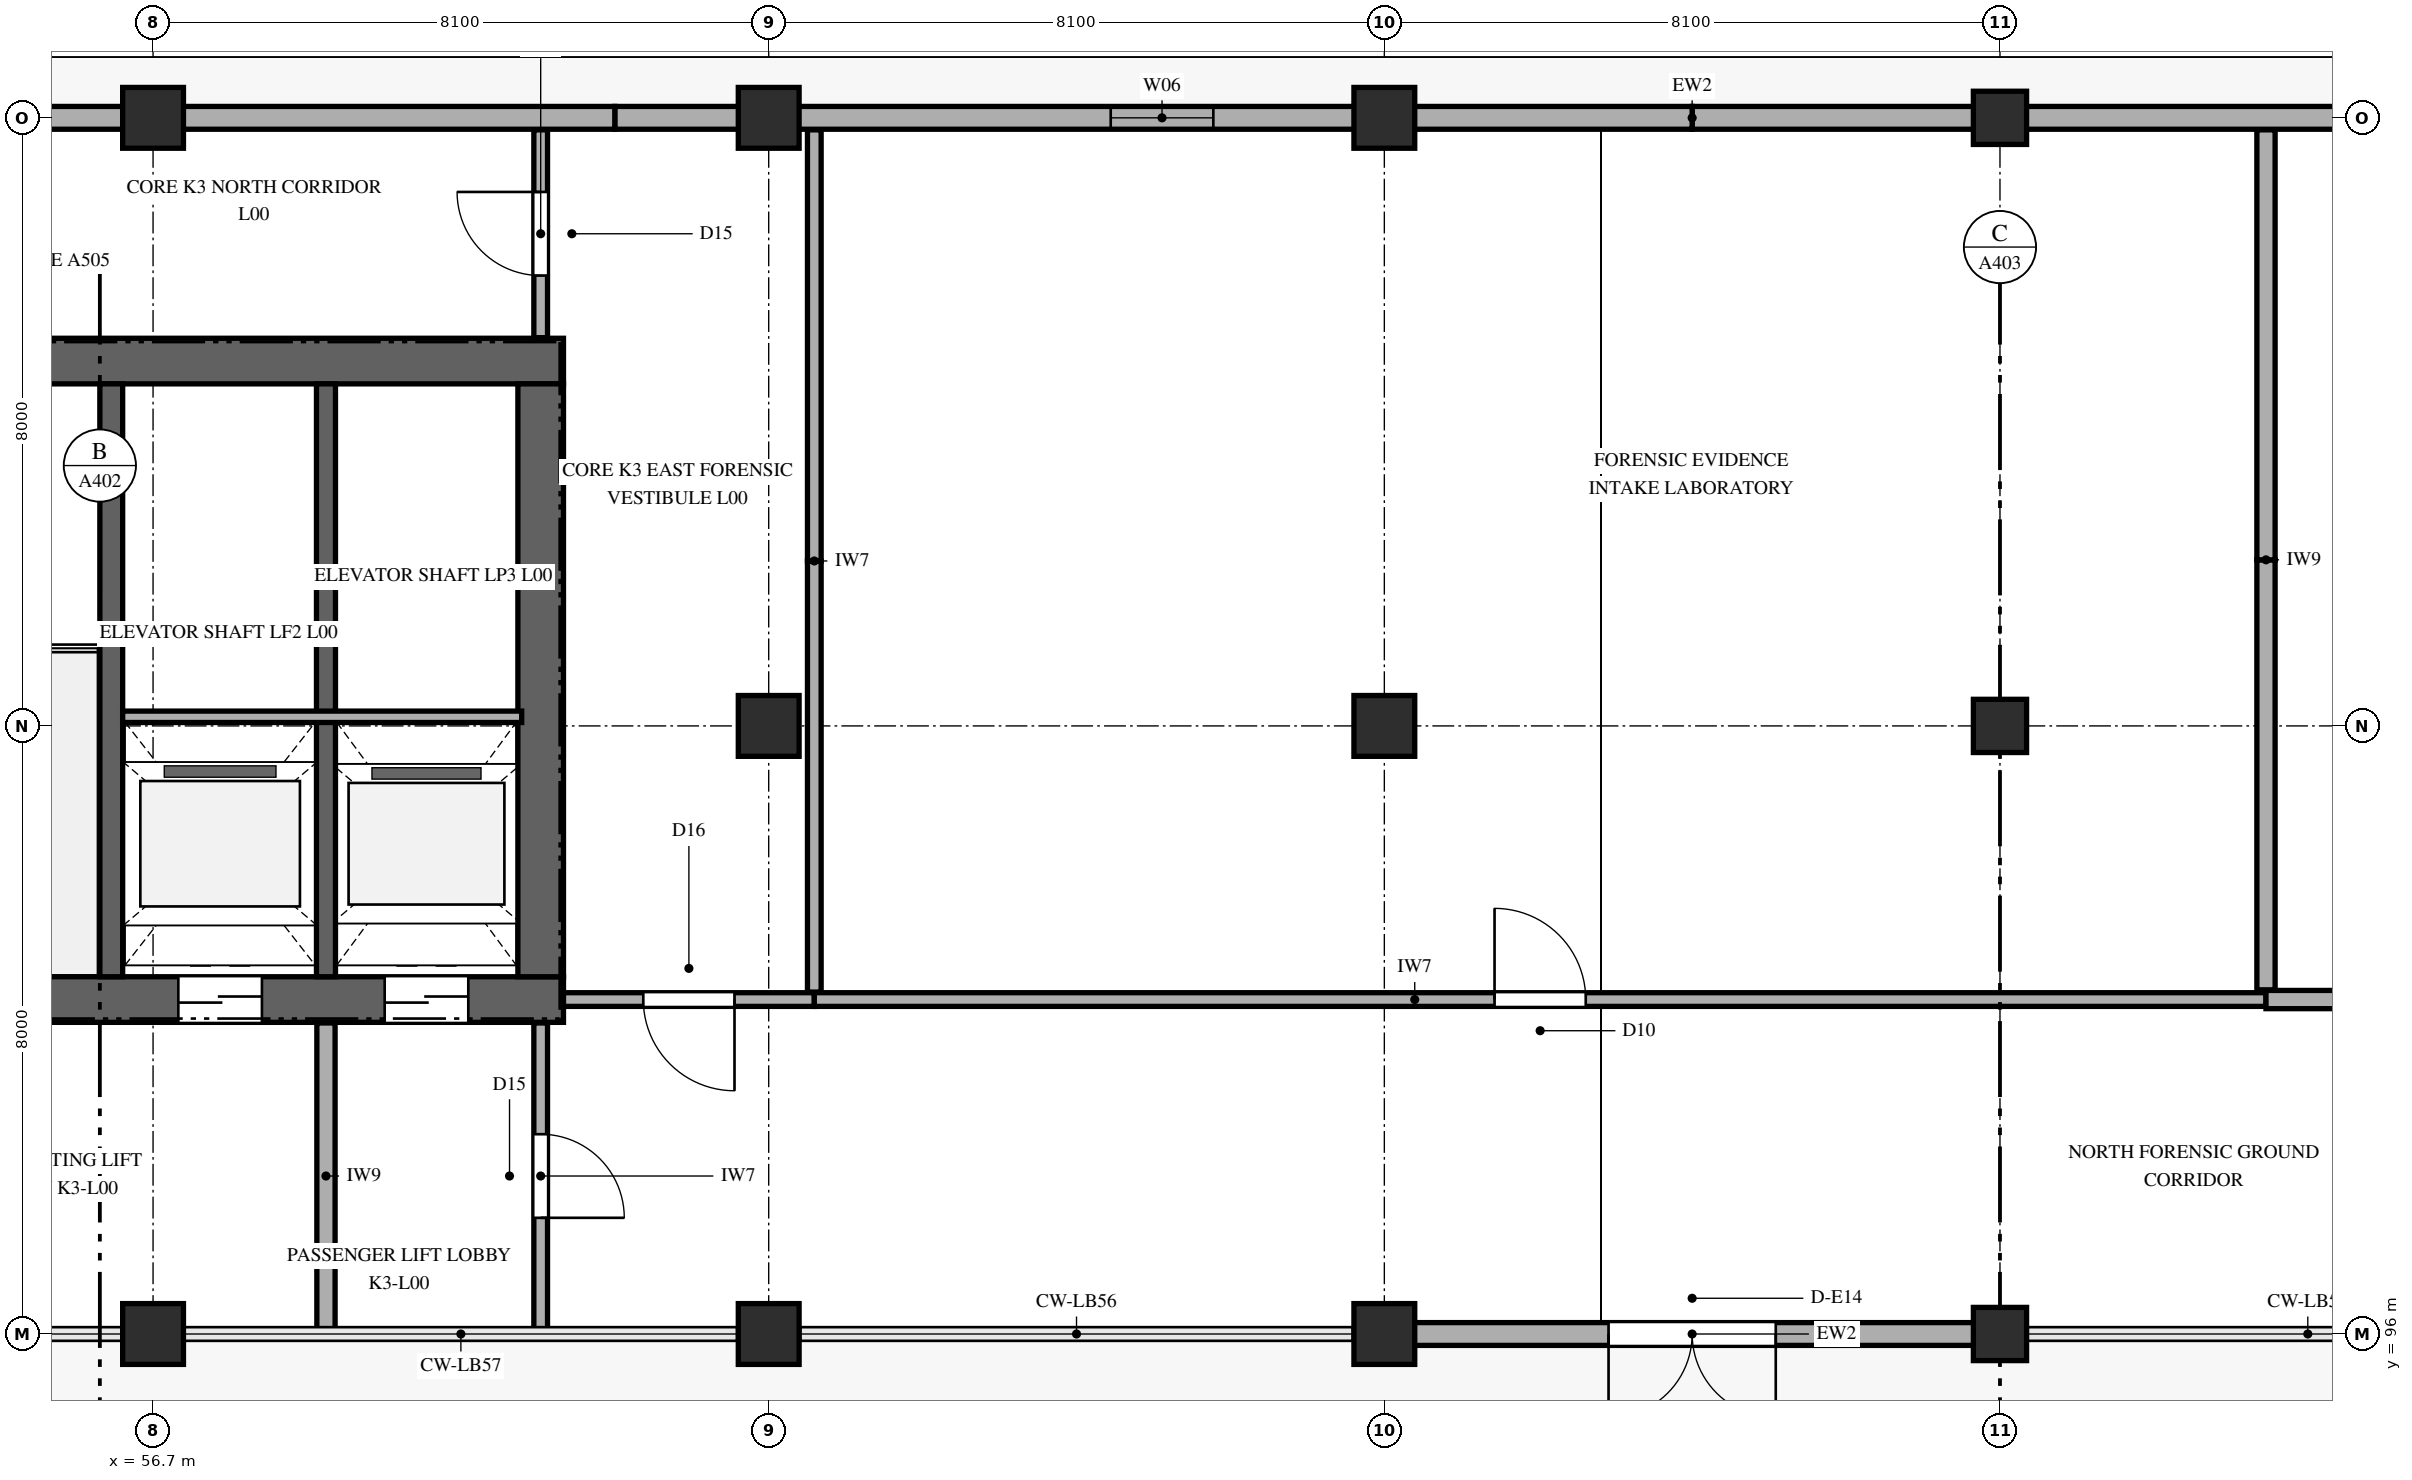
"""IFC4 building model, lengths in metres.
Left out: names, types, materials, properties, quantities, classifications, styles, units other than length and angle.
Written with IfcOpenShell. Run it as: python <this file> out.ifc"""

import sys

from ifc_helpers import new_model, si_unit, direction, frame, frame_2d, origin, origin_2d, place, context, subcontext, project, spatial, rectangle, extrude, element, fill, save


model = new_model("IFC4")
c1 = context("Model", 3, precision=1e-05, world=origin(), true_north=direction((0.0, 1.0)))
c2 = subcontext(c1, "Body", "Model", "MODEL_VIEW")
j1 = project(units=[si_unit("LENGTHUNIT", "METRE"), si_unit("PLANEANGLEUNIT", "RADIAN")], contexts=[c1])
p1 = place(None, origin())
s1 = spatial("IfcSite", under=j1, at=p1, CompositionType="ELEMENT")
p2 = place(p1, origin())
s2 = spatial("IfcBuilding", under=s1, at=p2, CompositionType="ELEMENT")
p3 = place(p2, origin())
s3 = spatial("IfcBuildingStorey", under=s2, at=p3, CompositionType="ELEMENT", Elevation=0.0)
p4 = place(p3, frame((46.7, 100.4, 0.0), z_axis=(0.0, 0.0, 1.0), x_axis=(1.0, 0.0, 0.0)))
e1 = element("IfcWall", 1, at=p4, inside=s3, PredefinedType="SHEAR", context=c2, shape_type="SweptSolid", body=[
    extrude(rectangle(XDim=15.4, YDim=0.6, at=frame_2d((7.7, 0.0))), origin(), (0.0, 0.0, 1.0), 5.4),
])
p5 = place(p4, frame((1.05, 0.0, 0.0)))
e2 = element("IfcOpeningElement", 2, at=p5, cuts=e1, PredefinedType="OPENING", context=c2, shape_type="SweptSolid", body=[
    extrude(rectangle(XDim=1.15, YDim=2.25, at=frame_2d((0.575, 1.125))), frame((0.0, 0.31, 0.0), z_axis=(0.0, -1.0, 0.0), x_axis=(1.0, 0.0, 0.0)), (0.0, 0.0, 1.0), 0.62),
])
p6 = place(p4, frame((10.333, 0.0, 0.0)))
e3 = element("IfcOpeningElement", 3, at=p6, cuts=e1, PredefinedType="OPENING", context=c2, shape_type="SweptSolid", body=[
    extrude(rectangle(XDim=1.1, YDim=2.2, at=frame_2d((0.55, 1.1))), frame((0.0, 0.31, 0.0), z_axis=(0.0, -1.0, 0.0), x_axis=(1.0, 0.0, 0.0)), (0.0, 0.0, 1.0), 0.62),
])
p7 = place(p4, frame((13.048, 0.0, 0.0)))
e4 = element("IfcOpeningElement", 4, at=p7, cuts=e1, PredefinedType="OPENING", context=c2, shape_type="SweptSolid", body=[
    extrude(rectangle(XDim=1.1, YDim=2.2, at=frame_2d((0.55, 1.1))), frame((0.0, 0.31, 0.0), z_axis=(0.0, -1.0, 0.0), x_axis=(1.0, 0.0, 0.0)), (0.0, 0.0, 1.0), 0.62),
])
p8 = place(p3, frame((46.7, 108.8, 0.0), z_axis=(0.0, 0.0, 1.0), x_axis=(1.0, 0.0, 0.0)))
e5 = element("IfcWall", 5, at=p8, inside=s3, PredefinedType="SHEAR", context=c2, shape_type="SweptSolid", body=[
    extrude(rectangle(XDim=15.4, YDim=0.6, at=frame_2d((7.7, 0.0))), origin(), (0.0, 0.0, 1.0), 5.4),
])
p9 = place(p3, frame((61.8, 100.7, 0.0), z_axis=(0.0, 0.0, 1.0), x_axis=(0.0, 1.0, 0.0)))
e6 = element("IfcWall", 6, at=p9, inside=s3, PredefinedType="SHEAR", context=c2, shape_type="SweptSolid", body=[
    extrude(rectangle(XDim=7.8, YDim=0.6, at=frame_2d((3.9, 0.0))), origin(), (0.0, 0.0, 1.0), 5.4),
])
p10 = place(p3, frame((56.15, 100.7, 0.0), z_axis=(0.0, 0.0, 1.0), x_axis=(0.0, 1.0, 0.0)))
e7 = element("IfcWall", 7, at=p10, inside=s3, PredefinedType="SHEAR", context=c2, shape_type="SweptSolid", body=[
    extrude(rectangle(XDim=7.8, YDim=0.3, at=frame_2d((3.9, 0.0))), origin(), (0.0, 0.0, 1.0), 5.4),
])
p11 = place(p3, frame((58.975, 100.7, 0.0), z_axis=(0.0, 0.0, 1.0), x_axis=(0.0, 1.0, 0.0)))
e8 = element("IfcWall", 8, at=p11, inside=s3, PredefinedType="SHEAR", context=c2, shape_type="SweptSolid", body=[
    extrude(rectangle(XDim=7.8, YDim=0.25, at=frame_2d((3.9, 0.0))), origin(), (0.0, 0.0, 1.0), 5.4),
])
for number, where, z_axis, x_axis in (
    (9, (56.7, 96.0, 0.0), (0.0, 0.0, 1.0), (1.0, 0.0, 0.0)),
    (10, (56.7, 112.0, 0.0), (0.0, 0.0, 1.0), (1.0, 0.0, 0.0)),
    (11, (64.8, 96.0, 0.0), (0.0, 0.0, 1.0), (1.0, 0.0, 0.0)),
    (12, (64.8, 104.0, 0.0), (0.0, 0.0, 1.0), (1.0, 0.0, 0.0)),
    (13, (64.8, 112.0, 0.0), (0.0, 0.0, 1.0), (1.0, 0.0, 0.0)),
    (14, (72.9, 96.0, 0.0), (0.0, 0.0, 1.0), (1.0, 0.0, 0.0)),
    (15, (72.9, 104.0, 0.0), (0.0, 0.0, 1.0), (1.0, 0.0, 0.0)),
    (16, (72.9, 112.0, 0.0), (0.0, 0.0, 1.0), (1.0, 0.0, 0.0)),
):
    element("IfcColumn", number, at=place(p3, frame(where, z_axis=z_axis, x_axis=x_axis)), inside=s3, PredefinedType="COLUMN", context=c2, shape_type="SweptSolid", body=[
        extrude(rectangle(XDim=0.8, YDim=0.8, at=origin_2d()), origin(), (0.0, 0.0, 1.0), 5.4),
    ])
for number, where, z_axis, x_axis in (
    (17, (81.0, 96.0, 0.0), (0.0, 0.0, 1.0), (1.0, 0.0, 0.0)),
    (18, (81.0, 104.0, 0.0), (0.0, 0.0, 1.0), (1.0, 0.0, 0.0)),
    (19, (81.0, 112.0, 0.0), (0.0, 0.0, 1.0), (1.0, 0.0, 0.0)),
):
    element("IfcColumn", number, at=place(p3, frame(where, z_axis=z_axis, x_axis=x_axis)), inside=s3, PredefinedType="COLUMN", context=c2, shape_type="SweptSolid", body=[
        extrude(rectangle(XDim=0.7, YDim=0.7, at=origin_2d()), origin(), (0.0, 0.0, 1.0), 5.4),
    ])
p12 = place(p3, frame((73.08, 96.0, 0.0), z_axis=(0.0, 0.0, 1.0), x_axis=(1.0, 0.0, 0.0)))
e20 = element("IfcWall", 20, at=p12, inside=s3, PredefinedType="SOLIDWALL", context=c2, shape_type="SweptSolid", body=[
    extrude(rectangle(XDim=7.74, YDim=0.3, at=frame_2d((3.87, 0.0))), origin(), (0.0, 0.0, 1.0), 4.412),
])
p13 = place(p12, frame((2.77, 0.0, 0.0)))
e21 = element("IfcOpeningElement", 21, at=p13, cuts=e20, PredefinedType="OPENING", context=c2, shape_type="SweptSolid", body=[
    extrude(rectangle(XDim=2.2, YDim=2.6, at=frame_2d((1.1, 1.3))), frame((0.0, 0.16, 0.0), z_axis=(0.0, -1.0, 0.0), x_axis=(1.0, 0.0, 0.0)), (0.0, 0.0, 1.0), 0.32),
])
p14 = place(p3, frame((91.125, 112.0, 0.0), z_axis=(0.0, 0.0, 1.0), x_axis=(-1.0, 0.0, 0.0)))
e22 = element("IfcWall", 22, at=p14, inside=s3, PredefinedType="SOLIDWALL", context=c2, shape_type="SweptSolid", body=[
    extrude(rectangle(XDim=14.175, YDim=0.3, at=frame_2d((7.087, 0.0))), origin(), (0.0, 0.0, 1.0), 4.412),
])
p15 = place(p14, frame((4.05, 0.0, 0.95)))
e23 = element("IfcOpeningElement", 23, at=p15, cuts=e22, PredefinedType="OPENING", context=c2, shape_type="SweptSolid", body=[
    extrude(rectangle(XDim=1.35, YDim=1.8, at=frame_2d((0.675, 0.9))), frame((0.0, 0.16, 0.0), z_axis=(0.0, -1.0, 0.0), x_axis=(1.0, 0.0, 0.0)), (0.0, 0.0, 1.0), 0.32),
])
p16 = place(p3, frame((76.95, 112.0, 0.0), z_axis=(0.0, 0.0, 1.0), x_axis=(-1.0, 0.0, 0.0)))
e24 = element("IfcWall", 24, at=p16, inside=s3, PredefinedType="SOLIDWALL", context=c2, shape_type="SweptSolid", body=[
    extrude(rectangle(XDim=14.175, YDim=0.3, at=frame_2d((7.087, 0.0))), origin(), (0.0, 0.0, 1.0), 4.412),
])
p17 = place(p16, frame((6.3, 0.0, 0.85)))
e25 = element("IfcOpeningElement", 25, at=p17, cuts=e24, PredefinedType="OPENING", context=c2, shape_type="SweptSolid", body=[
    extrude(rectangle(XDim=1.35, YDim=2.1, at=frame_2d((0.675, 1.05))), frame((0.0, 0.16, 0.0), z_axis=(0.0, -1.0, 0.0), x_axis=(1.0, 0.0, 0.0)), (0.0, 0.0, 1.0), 0.32),
])
p18 = place(p3, frame((62.775, 112.0, 0.0), z_axis=(0.0, 0.0, 1.0), x_axis=(-1.0, 0.0, 0.0)))
e26 = element("IfcWall", 26, at=p18, inside=s3, PredefinedType="SOLIDWALL", context=c2, shape_type="SweptSolid", body=[
    extrude(rectangle(XDim=14.175, YDim=0.3, at=frame_2d((7.087, 0.0))), origin(), (0.0, 0.0, 1.0), 4.412),
])
p19 = place(p18, frame((8.55, 0.0, 0.95)))
e27 = element("IfcOpeningElement", 27, at=p19, cuts=e26, PredefinedType="OPENING", context=c2, shape_type="SweptSolid", body=[
    extrude(rectangle(XDim=1.5, YDim=1.8, at=frame_2d((0.75, 0.9))), frame((0.0, 0.16, 0.0), z_axis=(0.0, -1.0, 0.0), x_axis=(1.0, 0.0, 0.0)), (0.0, 0.0, 1.0), 0.32),
])
p20 = place(p3, frame((56.3, 104.12, 0.0), z_axis=(0.0, 0.0, 1.0), x_axis=(1.0, 0.0, 0.0)))
e28 = element("IfcWall", 28, at=p20, inside=s3, PredefinedType="PARTITIONING", context=c2, shape_type="SweptSolid", body=[
    extrude(rectangle(XDim=5.25, YDim=0.15, at=frame_2d((2.625, 0.0))), origin(), (0.0, 0.0, 1.0), 5.12),
])
p21 = place(p3, frame((62.1, 100.4, 0.0), z_axis=(0.0, 0.0, 1.0), x_axis=(1.0, 0.0, 0.0)))
e29 = element("IfcWall", 29, at=p21, inside=s3, PredefinedType="PARTITIONING", context=c2, shape_type="SweptSolid", body=[
    extrude(rectangle(XDim=3.3, YDim=0.18, at=frame_2d((1.65, 0.0))), origin(), (0.0, 0.0, 1.0), 5.12),
])
p22 = place(p21, frame((1.05, 0.0, 0.0)))
e30 = element("IfcOpeningElement", 30, at=p22, cuts=e29, PredefinedType="OPENING", context=c2, shape_type="SweptSolid", body=[
    extrude(rectangle(XDim=1.2, YDim=2.2, at=frame_2d((0.6, 1.1))), frame((0.0, 0.1, 0.0), z_axis=(0.0, -1.0, 0.0), x_axis=(1.0, 0.0, 0.0)), (0.0, 0.0, 1.0), 0.2),
])
p23 = place(p3, frame((65.4, 100.4, 0.0), z_axis=(0.0, 0.0, 1.0), x_axis=(1.0, 0.0, 0.0)))
e31 = element("IfcWall", 31, at=p23, inside=s3, PredefinedType="PARTITIONING", context=c2, shape_type="SweptSolid", body=[
    extrude(rectangle(XDim=19.1, YDim=0.18, at=frame_2d((9.55, 0.0))), origin(), (0.0, 0.0, 1.0), 5.12),
])
p24 = place(p23, frame((8.95, 0.0, 0.0)))
e32 = element("IfcOpeningElement", 32, at=p24, cuts=e31, PredefinedType="OPENING", context=c2, shape_type="SweptSolid", body=[
    extrude(rectangle(XDim=1.2, YDim=2.3, at=frame_2d((0.6, 1.15))), frame((0.0, 0.1, 0.0), z_axis=(0.0, -1.0, 0.0), x_axis=(1.0, 0.0, 0.0)), (0.0, 0.0, 1.0), 0.2),
])
p25 = place(p3, frame((84.5, 100.4, 0.0), z_axis=(0.0, 0.0, 1.0), x_axis=(1.0, 0.0, 0.0)))
e33 = element("IfcWall", 33, at=p25, inside=s3, PredefinedType="PARTITIONING", context=c2, shape_type="SweptSolid", body=[
    extrude(rectangle(XDim=20.617, YDim=0.24, at=frame_2d((10.309, 0.0))), origin(), (0.0, 0.0, 1.0), 5.12),
])
p26 = place(p25, frame((9.608, 0.0, 0.0)))
e34 = element("IfcOpeningElement", 34, at=p26, cuts=e33, PredefinedType="OPENING", context=c2, shape_type="SweptSolid", body=[
    extrude(rectangle(XDim=1.4, YDim=2.35, at=frame_2d((0.7, 1.175))), frame((0.0, 0.13, 0.0), z_axis=(0.0, -1.0, 0.0), x_axis=(1.0, 0.0, 0.0)), (0.0, 0.0, 1.0), 0.26),
])
p27 = place(p3, frame((58.975, 96.065, 0.0), z_axis=(0.0, 0.0, 1.0), x_axis=(0.0, 1.0, 0.0)))
e35 = element("IfcWall", 35, at=p27, inside=s3, PredefinedType="PARTITIONING", context=c2, shape_type="SweptSolid", body=[
    extrude(rectangle(XDim=4.027, YDim=0.24, at=frame_2d((2.014, 0.0))), origin(), (0.0, 0.0, 1.0), 5.12),
])
p28 = place(p3, frame((61.8, 96.065, 0.0), z_axis=(0.0, 0.0, 1.0), x_axis=(0.0, 1.0, 0.0)))
e36 = element("IfcWall", 36, at=p28, inside=s3, PredefinedType="PARTITIONING", context=c2, shape_type="SweptSolid", body=[
    extrude(rectangle(XDim=4.027, YDim=0.18, at=frame_2d((2.014, 0.0))), origin(), (0.0, 0.0, 1.0), 5.12),
])
p29 = place(p28, frame((1.463, 0.0, 0.0)))
e37 = element("IfcOpeningElement", 37, at=p29, cuts=e36, PredefinedType="OPENING", context=c2, shape_type="SweptSolid", body=[
    extrude(rectangle(XDim=1.1, YDim=2.2, at=frame_2d((0.55, 1.1))), frame((0.0, 0.1, 0.0), z_axis=(0.0, -1.0, 0.0), x_axis=(1.0, 0.0, 0.0)), (0.0, 0.0, 1.0), 0.2),
])
p30 = place(p3, frame((61.8, 109.108, 0.0), z_axis=(0.0, 0.0, 1.0), x_axis=(0.0, 1.0, 0.0)))
e38 = element("IfcWall", 38, at=p30, inside=s3, PredefinedType="PARTITIONING", context=c2, shape_type="SweptSolid", body=[
    extrude(rectangle(XDim=2.734, YDim=0.18, at=frame_2d((1.367, 0.0))), origin(), (0.0, 0.0, 1.0), 5.12),
])
p31 = place(p30, frame((0.817, 0.0, 0.0)))
e39 = element("IfcOpeningElement", 39, at=p31, cuts=e38, PredefinedType="OPENING", context=c2, shape_type="SweptSolid", body=[
    extrude(rectangle(XDim=1.1, YDim=2.2, at=frame_2d((0.55, 1.1))), frame((0.0, 0.1, 0.0), z_axis=(0.0, -1.0, 0.0), x_axis=(1.0, 0.0, 0.0)), (0.0, 0.0, 1.0), 0.2),
])
p32 = place(p3, frame((65.4, 100.498, 0.0), z_axis=(0.0, 0.0, 1.0), x_axis=(0.0, 1.0, 0.0)))
e40 = element("IfcWall", 40, at=p32, inside=s3, PredefinedType="PARTITIONING", context=c2, shape_type="SweptSolid", body=[
    extrude(rectangle(XDim=5.672, YDim=0.18, at=frame_2d((2.836, 0.0))), origin(), (0.0, 0.0, 1.0), 5.12),
])
p33 = place(p3, frame((65.4, 106.17, 0.0), z_axis=(0.0, 0.0, 1.0), x_axis=(0.0, 1.0, 0.0)))
e41 = element("IfcWall", 41, at=p33, inside=s3, PredefinedType="PARTITIONING", context=c2, shape_type="SweptSolid", body=[
    extrude(rectangle(XDim=5.672, YDim=0.18, at=frame_2d((2.836, 0.0))), origin(), (0.0, 0.0, 1.0), 5.12),
])
for number, where, z_axis, x_axis in (
    (42, (84.5, 100.528, 0.0), (0.0, 0.0, 1.0), (0.0, 1.0, 0.0)),
    (43, (84.5, 106.185, 0.0), (0.0, 0.0, 1.0), (0.0, 1.0, 0.0)),
):
    element("IfcWall", number, at=place(p3, frame(where, z_axis=z_axis, x_axis=x_axis)), inside=s3, PredefinedType="PARTITIONING", context=c2, shape_type="SweptSolid", body=[
        extrude(rectangle(XDim=5.657, YDim=0.24, at=frame_2d((2.829, 0.0))), origin(), (0.0, 0.0, 1.0), 5.12),
    ])
p34 = place(p13, frame((2.2, 0.0, 0.0), z_axis=(0.0, 0.0, 1.0), x_axis=(-1.0, 0.0, 0.0)))
e44 = element("IfcDoor", 44, at=p34, inside=s3, OperationType="DOUBLE_DOOR_SINGLE_SWING", PredefinedType="DOOR", context=c2, shape_type="SweptSolid", body=[
    extrude(rectangle(XDim=2.2, YDim=2.6, at=frame_2d((1.1, 1.3))), frame((0.0, 0.025, 0.0), z_axis=(0.0, -1.0, 0.0), x_axis=(1.0, 0.0, 0.0)), (0.0, 0.0, 1.0), 0.05),
])
fill(e21, e44)
p35 = place(p17, origin())
e45 = element("IfcWindow", 45, at=p35, inside=s3, PartitioningType="DOUBLE_PANEL_VERTICAL", PredefinedType="WINDOW", context=c2, shape_type="SweptSolid", body=[
    extrude(rectangle(XDim=1.35, YDim=2.1, at=frame_2d((0.675, 1.05))), frame((0.0, 0.03, 0.0), z_axis=(0.0, -1.0, 0.0), x_axis=(1.0, 0.0, 0.0)), (0.0, 0.0, 1.0), 0.06),
])
fill(e25, e45)
p36 = place(p6, frame((1.1, 0.0, 0.0), z_axis=(0.0, 0.0, 1.0), x_axis=(-1.0, 0.0, 0.0)))
e46 = element("IfcDoor", 46, at=p36, inside=s3, OperationType="DOUBLE_DOOR_SLIDING", PredefinedType="DOOR", context=c2, shape_type="SweptSolid", body=[
    extrude(rectangle(XDim=1.1, YDim=2.2, at=frame_2d((0.55, 1.1))), frame((0.0, 0.025, 0.0), z_axis=(0.0, -1.0, 0.0), x_axis=(1.0, 0.0, 0.0)), (0.0, 0.0, 1.0), 0.05),
])
fill(e3, e46)
p37 = place(p7, frame((1.1, 0.0, 0.0), z_axis=(0.0, 0.0, 1.0), x_axis=(-1.0, 0.0, 0.0)))
e47 = element("IfcDoor", 47, at=p37, inside=s3, OperationType="DOUBLE_DOOR_SLIDING", PredefinedType="DOOR", context=c2, shape_type="SweptSolid", body=[
    extrude(rectangle(XDim=1.1, YDim=2.2, at=frame_2d((0.55, 1.1))), frame((0.0, 0.025, 0.0), z_axis=(0.0, -1.0, 0.0), x_axis=(1.0, 0.0, 0.0)), (0.0, 0.0, 1.0), 0.05),
])
fill(e4, e47)
p38 = place(p22, frame((1.2, 0.0, 0.0), z_axis=(0.0, 0.0, 1.0), x_axis=(-1.0, 0.0, 0.0)))
e48 = element("IfcDoor", 48, at=p38, inside=s3, OperationType="SINGLE_SWING_RIGHT", PredefinedType="DOOR", context=c2, shape_type="SweptSolid", body=[
    extrude(rectangle(XDim=1.2, YDim=2.2, at=frame_2d((0.6, 1.1))), frame((0.0, 0.025, 0.0), z_axis=(0.0, -1.0, 0.0), x_axis=(1.0, 0.0, 0.0)), (0.0, 0.0, 1.0), 0.05),
])
fill(e30, e48)
p39 = place(p24, origin())
e49 = element("IfcDoor", 49, at=p39, inside=s3, OperationType="SINGLE_SWING_LEFT", PredefinedType="DOOR", context=c2, shape_type="SweptSolid", body=[
    extrude(rectangle(XDim=1.2, YDim=2.3, at=frame_2d((0.6, 1.15))), frame((0.0, 0.025, 0.0), z_axis=(0.0, -1.0, 0.0), x_axis=(1.0, 0.0, 0.0)), (0.0, 0.0, 1.0), 0.05),
])
fill(e32, e49)
p40 = place(p29, frame((1.1, 0.0, 0.0), z_axis=(0.0, 0.0, 1.0), x_axis=(-1.0, 0.0, 0.0)))
e50 = element("IfcDoor", 50, at=p40, inside=s3, OperationType="SINGLE_SWING_LEFT", PredefinedType="DOOR", context=c2, shape_type="SweptSolid", body=[
    extrude(rectangle(XDim=1.1, YDim=2.2, at=frame_2d((0.55, 1.1))), frame((0.0, 0.025, 0.0), z_axis=(0.0, -1.0, 0.0), x_axis=(1.0, 0.0, 0.0)), (0.0, 0.0, 1.0), 0.05),
])
fill(e37, e50)
p41 = place(p31, origin())
e51 = element("IfcDoor", 51, at=p41, inside=s3, OperationType="SINGLE_SWING_RIGHT", PredefinedType="DOOR", context=c2, shape_type="SweptSolid", body=[
    extrude(rectangle(XDim=1.1, YDim=2.2, at=frame_2d((0.55, 1.1))), frame((0.0, 0.025, 0.0), z_axis=(0.0, -1.0, 0.0), x_axis=(1.0, 0.0, 0.0)), (0.0, 0.0, 1.0), 0.05),
])
fill(e39, e51)
save(model, sys.argv[1])
